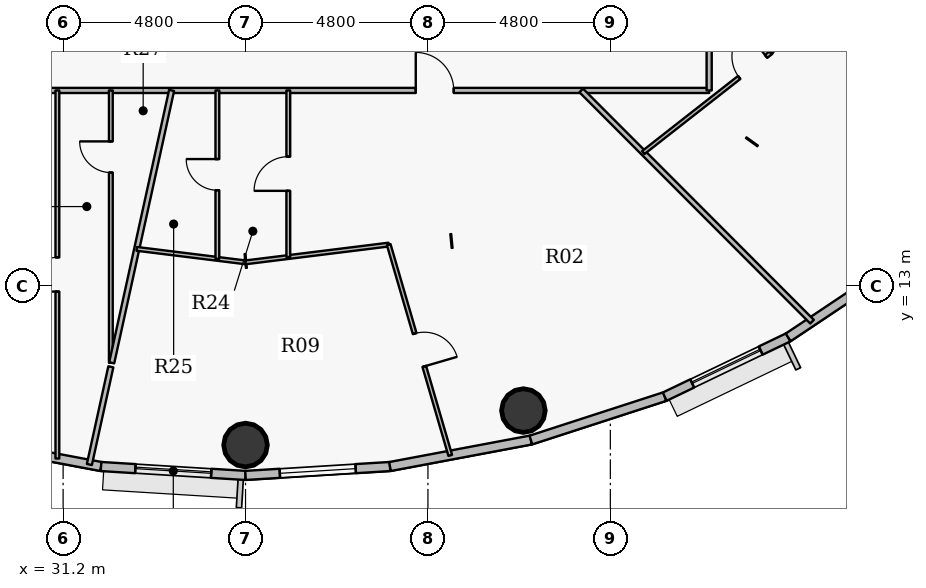
"""IFC4 building model, lengths in metres.
Left out: names, types, materials, properties, quantities, classifications, styles, units other than length and angle.
Written with IfcOpenShell. Run it as: python <this file> out.ifc"""

import sys

from ifc_helpers import new_model, si_unit, direction, frame, frame_2d, origin, origin_2d, place, context, subcontext, project, spatial, rectangle, hollow_circle, extrude, source, transform, mapped, element, fill, save


model = new_model("IFC4")
c1 = context("Model", 3, precision=1e-05, world=origin(), true_north=direction((0.0, 1.0)))
c2 = subcontext(c1, "Body", "Model", "MODEL_VIEW")
j1 = project(units=[si_unit("LENGTHUNIT", "METRE"), si_unit("PLANEANGLEUNIT", "RADIAN")], contexts=[c1])
p1 = place(None, origin())
s1 = spatial("IfcSite", under=j1, at=p1, CompositionType="ELEMENT")
p2 = place(p1, origin())
s2 = spatial("IfcBuilding", under=s1, at=p2, CompositionType="ELEMENT")
p3 = place(p2, frame((0.0, 0.0, 214.05)))
s3 = spatial("IfcBuildingStorey", under=s2, at=p3, CompositionType="ELEMENT", Elevation=214.05)
for number, where, z_axis, x_axis in (
    (1, (36.0, 8.82, 0.0), (0.0, 0.0, 1.0), (1.0, 0.0, 0.0)),
    (2, (43.312, 9.727, 0.0), (0.0, 0.0, 1.0), (1.0, 0.0, 0.0)),
):
    element("IfcColumn", number, at=place(p3, frame(where, z_axis=z_axis, x_axis=x_axis)), inside=s3, PredefinedType="COLUMN", context=c2, shape_type="SweptSolid", body=[
        extrude(hollow_circle(Radius=0.575, WallThickness=0.036, at=origin_2d()), origin(), (0.0, 0.0, 1.0), 3.75),
    ])
p4 = place(p3, frame((32.198, 8.254, 0.0), z_axis=(0.0, 0.0, 1.0), x_axis=(-0.982784898575, 0.184753465822, 0.0)))
e3 = element("IfcWall", 3, at=p4, inside=s3, PredefinedType="SOLIDWALL", context=c2, shape_type="SweptSolid", body=[
    extrude(rectangle(XDim=3.773, YDim=0.24, at=frame_2d((1.886, 0.0))), origin(), (0.0, 0.0, 1.0), 3.5),
])
p5 = place(p4, frame((1.664, 0.0, 0.9)))
e4 = element("IfcOpeningElement", 4, at=p5, cuts=e3, PredefinedType="OPENING", context=c2, shape_type="SweptSolid", body=[
    extrude(rectangle(XDim=1.25, YDim=1.65, at=origin_2d()), frame((0.625, 0.13, 0.825), z_axis=(0.0, -1.0, 0.0), x_axis=(1.0, 0.0, 0.0)), (0.0, 0.0, 1.0), 0.26),
])
p6 = place(p3, frame((36.0, 8.02, 0.0), z_axis=(0.0, 0.0, 1.0), x_axis=(-0.998108785312, 0.06147237333, 0.0)))
e5 = element("IfcWall", 5, at=p6, inside=s3, PredefinedType="SOLIDWALL", context=c2, shape_type="SweptSolid", body=[
    extrude(rectangle(XDim=3.809, YDim=0.24, at=frame_2d((1.904, 0.0))), origin(), (0.0, 0.0, 1.0), 3.5),
])
p7 = place(p6, frame((0.904, 0.0, 0.9)))
e6 = element("IfcOpeningElement", 6, at=p7, cuts=e5, PredefinedType="OPENING", context=c2, shape_type="SweptSolid", body=[
    extrude(rectangle(XDim=2.0, YDim=1.75, at=origin_2d()), frame((1.0, 0.13, 0.875), z_axis=(0.0, -1.0, 0.0), x_axis=(1.0, 0.0, 0.0)), (0.0, 0.0, 1.0), 0.26),
])
p8 = place(p3, frame((39.802, 8.254, 0.0), z_axis=(0.0, 0.0, 1.0), x_axis=(-0.998108785312, -0.06147237333, 0.0)))
e7 = element("IfcWall", 7, at=p8, inside=s3, PredefinedType="SOLIDWALL", context=c2, shape_type="SweptSolid", body=[
    extrude(rectangle(XDim=3.809, YDim=0.24, at=frame_2d((1.904, 0.0))), origin(), (0.0, 0.0, 1.0), 3.5),
])
p9 = place(p8, frame((0.905, 0.0, 0.9)))
e8 = element("IfcOpeningElement", 8, at=p9, cuts=e7, PredefinedType="OPENING", context=c2, shape_type="SweptSolid", body=[
    extrude(rectangle(XDim=2.0, YDim=1.75, at=origin_2d()), frame((1.0, 0.13, 0.875), z_axis=(0.0, -1.0, 0.0), x_axis=(1.0, 0.0, 0.0)), (0.0, 0.0, 1.0), 0.26),
])
p10 = place(p3, frame((43.509, 8.951, 0.0), z_axis=(0.0, 0.0, 1.0), x_axis=(-0.982784898575, -0.184753465822, 0.0)))
e9 = element("IfcWall", 9, at=p10, inside=s3, PredefinedType="SOLIDWALL", context=c2, shape_type="SweptSolid", body=[
    extrude(rectangle(XDim=3.773, YDim=0.24, at=frame_2d((1.886, 0.0))), origin(), (0.0, 0.0, 1.0), 3.5),
])
p11 = place(p3, frame((47.031, 10.094, 0.0), z_axis=(0.0, 0.0, 1.0), x_axis=(-0.951210789182, -0.308541787354, 0.0)))
e10 = element("IfcWall", 10, at=p11, inside=s3, PredefinedType="SOLIDWALL", context=c2, shape_type="SweptSolid", body=[
    extrude(rectangle(XDim=3.702, YDim=0.24, at=frame_2d((1.851, 0.0))), origin(), (0.0, 0.0, 1.0), 3.5),
])
p12 = place(p3, frame((50.28, 11.652, 0.0), z_axis=(0.0, 0.0, 1.0), x_axis=(-0.901598104751, -0.432574684313, 0.0)))
e11 = element("IfcWall", 11, at=p12, inside=s3, PredefinedType="SOLIDWALL", context=c2, shape_type="SweptSolid", body=[
    extrude(rectangle(XDim=3.604, YDim=0.24, at=frame_2d((1.802, 0.0))), origin(), (0.0, 0.0, 1.0), 3.5),
])
p13 = place(p12, frame((0.802, 0.0, 0.9)))
e12 = element("IfcOpeningElement", 12, at=p13, cuts=e11, PredefinedType="OPENING", context=c2, shape_type="SweptSolid", body=[
    extrude(rectangle(XDim=2.0, YDim=1.75, at=origin_2d()), frame((1.0, 0.13, 0.875), z_axis=(0.0, -1.0, 0.0), x_axis=(1.0, 0.0, 0.0)), (0.0, 0.0, 1.0), 0.26),
])
p14 = place(p3, frame((53.176, 13.589, 0.0), z_axis=(0.0, 0.0, 1.0), x_axis=(-0.831262496074, -0.555880079352, 0.0)))
e13 = element("IfcWall", 13, at=p14, inside=s3, PredefinedType="SOLIDWALL", context=c2, shape_type="SweptSolid", body=[
    extrude(rectangle(XDim=3.484, YDim=0.24, at=frame_2d((1.742, 0.0))), origin(), (0.0, 0.0, 1.0), 3.5),
])
p15 = place(p3, frame((24.35, 18.15, 0.0), z_axis=(0.0, 0.0, 1.0), x_axis=(1.0, 0.0, 0.0)))
e14 = element("IfcWall", 14, at=p15, inside=s3, PredefinedType="PARTITIONING", context=c2, shape_type="SweptSolid", body=[
    extrude(rectangle(XDim=23.85, YDim=0.135, at=frame_2d((11.925, 0.0))), origin(), (0.0, 0.0, 1.0), 2.935),
])
p16 = place(p15, frame((2.87, 0.0, 0.0)))
e15 = element("IfcOpeningElement", 15, at=p16, cuts=e14, PredefinedType="OPENING", context=c2, shape_type="SweptSolid", body=[
    extrude(rectangle(XDim=1.0, YDim=2.15, at=origin_2d()), frame((0.5, 0.078, 1.075), z_axis=(0.0, -1.0, 0.0), x_axis=(1.0, 0.0, 0.0)), (0.0, 0.0, 1.0), 0.155),
])
p17 = place(p15, frame((16.13, 0.0, 0.0)))
e16 = element("IfcOpeningElement", 16, at=p17, cuts=e14, PredefinedType="OPENING", context=c2, shape_type="SweptSolid", body=[
    extrude(rectangle(XDim=1.0, YDim=2.15, at=origin_2d()), frame((0.5, 0.078, 1.075), z_axis=(0.0, -1.0, 0.0), x_axis=(1.0, 0.0, 0.0)), (0.0, 0.0, 1.0), 0.155),
])
p18 = place(p3, frame((31.049, 8.465, 0.0), z_axis=(0.0, 0.0, 1.0), x_axis=(0.0, 1.0, 0.0)))
e17 = element("IfcWall", 17, at=p18, inside=s3, PredefinedType="PARTITIONING", context=c2, shape_type="SweptSolid", body=[
    extrude(rectangle(XDim=9.685, YDim=0.1, at=frame_2d((4.842, 0.0))), origin(), (0.0, 0.0, 1.0), 2.985),
])
p19 = place(p18, frame((4.392, 0.0, 0.0)))
e18 = element("IfcOpeningElement", 18, at=p19, cuts=e17, PredefinedType="OPENING", context=c2, shape_type="SweptSolid", body=[
    extrude(rectangle(XDim=0.9, YDim=2.1, at=origin_2d()), frame((0.45, 0.06, 1.05), z_axis=(0.0, -1.0, 0.0), x_axis=(1.0, 0.0, 0.0)), (0.0, 0.0, 1.0), 0.12),
])
p20 = place(p3, frame((31.891, 8.307, 0.0), z_axis=(0.0, 0.0, 1.0), x_axis=(0.214700779338, 0.976679873526, 0.0)))
e19 = element("IfcWall", 19, at=p20, inside=s3, PredefinedType="PARTITIONING", context=c2, shape_type="SweptSolid", body=[
    extrude(rectangle(XDim=2.632, YDim=0.135, at=frame_2d((1.316, 0.0))), origin(), (0.0, 0.0, 1.0), 2.985),
])
p21 = place(p3, frame((32.456, 10.985, 0.0), z_axis=(0.0, 0.0, 1.0), x_axis=(0.0, 1.0, 0.0)))
e20 = element("IfcWall", 20, at=p21, inside=s3, PredefinedType="PARTITIONING", context=c2, shape_type="SweptSolid", body=[
    extrude(rectangle(XDim=7.165, YDim=0.1, at=frame_2d((3.582, 0.0))), origin(), (0.0, 0.0, 1.0), 3.5),
])
p22 = place(p21, frame((5.004, 0.0, 0.0)))
e21 = element("IfcOpeningElement", 21, at=p22, cuts=e20, PredefinedType="OPENING", context=c2, shape_type="SweptSolid", body=[
    extrude(rectangle(XDim=0.82, YDim=2.1, at=origin_2d()), frame((0.41, 0.06, 1.05), z_axis=(0.0, -1.0, 0.0), x_axis=(1.0, 0.0, 0.0)), (0.0, 0.0, 1.0), 0.12),
])
p23 = place(p3, frame((32.479, 10.983, 0.0), z_axis=(0.0, 0.0, 1.0), x_axis=(0.214685976808, 0.976683127407, 0.0)))
e22 = element("IfcWall", 22, at=p23, inside=s3, PredefinedType="PARTITIONING", context=c2, shape_type="SweptSolid", body=[
    extrude(rectangle(XDim=7.338, YDim=0.135, at=frame_2d((3.669, 0.0))), origin(), (0.0, 0.0, 1.0), 3.5),
])
p24 = place(p3, frame((33.138, 13.981, 0.0), z_axis=(0.0, 0.0, 1.0), x_axis=(0.99239465631, -0.123096897311, 0.0)))
e23 = element("IfcWall", 23, at=p24, inside=s3, PredefinedType="PARTITIONING", context=c2, shape_type="SweptSolid", body=[
    extrude(rectangle(XDim=2.884, YDim=0.1, at=frame_2d((1.442, 0.0))), origin(), (0.0, 0.0, 1.0), 2.935),
])
p25 = place(p3, frame((35.259, 13.718, 0.0), z_axis=(0.0, 0.0, 1.0), x_axis=(0.0, 1.0, 0.0)))
e24 = element("IfcWall", 24, at=p25, inside=s3, PredefinedType="PARTITIONING", context=c2, shape_type="SweptSolid", body=[
    extrude(rectangle(XDim=4.432, YDim=0.1, at=frame_2d((2.216, 0.0))), origin(), (0.0, 0.0, 1.0), 3.5),
])
p26 = place(p25, frame((1.806, 0.0, 0.0)))
e25 = element("IfcOpeningElement", 25, at=p26, cuts=e24, PredefinedType="OPENING", context=c2, shape_type="SweptSolid", body=[
    extrude(rectangle(XDim=0.82, YDim=2.1, at=origin_2d()), frame((0.41, 0.06, 1.05), z_axis=(0.0, -1.0, 0.0), x_axis=(1.0, 0.0, 0.0)), (0.0, 0.0, 1.0), 0.12),
])
p27 = place(p3, frame((36.0, 13.626, 0.0), z_axis=(0.0, 0.0, 1.0), x_axis=(0.992397118202, 0.123077048159, 0.0)))
e26 = element("IfcWall", 26, at=p27, inside=s3, PredefinedType="PARTITIONING", context=c2, shape_type="SweptSolid", body=[
    extrude(rectangle(XDim=3.797, YDim=0.1, at=frame_2d((1.898, 0.0))), origin(), (0.0, 0.0, 1.0), 2.935),
])
p28 = place(p3, frame((37.126, 13.766, 0.0), z_axis=(0.0, 0.0, 1.0), x_axis=(0.0, 1.0, 0.0)))
e27 = element("IfcWall", 27, at=p28, inside=s3, PredefinedType="PARTITIONING", context=c2, shape_type="SweptSolid", body=[
    extrude(rectangle(XDim=4.384, YDim=0.1, at=frame_2d((2.192, 0.0))), origin(), (0.0, 0.0, 1.0), 3.185),
])
p29 = place(p28, frame((1.742, 0.0, 0.0)))
e28 = element("IfcOpeningElement", 28, at=p29, cuts=e27, PredefinedType="OPENING", context=c2, shape_type="SweptSolid", body=[
    extrude(rectangle(XDim=0.9, YDim=2.1, at=origin_2d()), frame((0.45, 0.06, 1.05), z_axis=(0.0, -1.0, 0.0), x_axis=(1.0, 0.0, 0.0)), (0.0, 0.0, 1.0), 0.12),
])
p30 = place(p3, frame((39.768, 14.094, 0.0), z_axis=(0.0, 0.0, 1.0), x_axis=(0.280219030024, -0.959936089129, 0.0)))
e29 = element("IfcWall", 29, at=p30, inside=s3, PredefinedType="PARTITIONING", context=c2, shape_type="SweptSolid", body=[
    extrude(rectangle(XDim=5.778, YDim=0.1, at=frame_2d((2.889, 0.0))), origin(), (0.0, 0.0, 1.0), 2.985),
])
p31 = place(p30, frame((2.439, 0.0, 0.0)))
e30 = element("IfcOpeningElement", 30, at=p31, cuts=e29, PredefinedType="OPENING", context=c2, shape_type="SweptSolid", body=[
    extrude(rectangle(XDim=0.9, YDim=2.1, at=origin_2d()), frame((0.45, 0.06, 1.05), z_axis=(0.0, -1.0, 0.0), x_axis=(1.0, 0.0, 0.0)), (0.0, 0.0, 1.0), 0.12),
])
p32 = place(p3, frame((44.833, 18.15, 0.0), z_axis=(0.0, 0.0, 1.0), x_axis=(0.706467502326, -0.707745482612, 0.0)))
e31 = element("IfcWall", 31, at=p32, inside=s3, PredefinedType="PARTITIONING", context=c2, shape_type="SweptSolid", body=[
    extrude(rectangle(XDim=8.597, YDim=0.135, at=frame_2d((4.298, 0.0))), origin(), (0.0, 0.0, 1.0), 2.985),
])
p33 = place(p3, frame((46.466, 16.515, 0.0), z_axis=(0.0, 0.0, 1.0), x_axis=(0.787371868093, 0.616478338092, 0.0)))
e32 = element("IfcWall", 32, at=p33, inside=s3, PredefinedType="PARTITIONING", context=c2, shape_type="SweptSolid", body=[
    extrude(rectangle(XDim=4.257, YDim=0.1, at=frame_2d((2.129, 0.0))), origin(), (0.0, 0.0, 1.0), 2.935),
])
p34 = place(p33, frame((3.206, 0.0, 0.0)))
e33 = element("IfcOpeningElement", 33, at=p34, cuts=e32, PredefinedType="OPENING", context=c2, shape_type="SweptSolid", body=[
    extrude(rectangle(XDim=0.9, YDim=2.1, at=origin_2d()), frame((0.45, 0.06, 1.05), z_axis=(0.0, -1.0, 0.0), x_axis=(1.0, 0.0, 0.0)), (0.0, 0.0, 1.0), 0.12),
])
p35 = place(p3, frame((48.2, 18.15, 0.0), z_axis=(0.0, 0.0, 1.0), x_axis=(0.0, 1.0, 0.0)))
e34 = element("IfcWall", 34, at=p35, inside=s3, PredefinedType="PARTITIONING", context=c2, shape_type="SweptSolid", body=[
    extrude(rectangle(XDim=1.9, YDim=0.135, at=frame_2d((0.95, 0.0))), origin(), (0.0, 0.0, 1.0), 3.5),
])
p36 = place(p3, frame((49.818, 19.139, 0.0), z_axis=(0.0, 0.0, 1.0), x_axis=(0.545406924684, 0.83817139447, 0.0)))
e35 = element("IfcWall", 35, at=p36, inside=s3, PredefinedType="PARTITIONING", context=c2, shape_type="SweptSolid", body=[
    extrude(rectangle(XDim=4.448, YDim=0.1, at=frame_2d((2.224, 0.0))), origin(), (0.0, 0.0, 1.0), 2.935),
])
m1 = source(origin(), c2, "Body", "SweptSolid", [
    extrude(rectangle(XDim=2.0, YDim=1.75, at=origin_2d()), frame((1.0, 0.03, 0.875), z_axis=(0.0, -1.0, 0.0), x_axis=(1.0, 0.0, 0.0)), (0.0, 0.0, 1.0), 0.06),
])
p37 = place(p7, origin())
e36 = element("IfcWindow", 36, at=p37, inside=s3, PartitioningType="DOUBLE_PANEL_VERTICAL", PredefinedType="WINDOW", context=c2, shape_type="MappedRepresentation", body=[
    mapped(m1, transform((0.0, 0.0, 0.0), x_axis=(1.0, 0.0, 0.0), y_axis=(0.0, 1.0, 0.0), z_axis=(0.0, 0.0, 1.0), scale=1.0)),
])
fill(e6, e36)
p38 = place(p9, origin())
e37 = element("IfcWindow", 37, at=p38, inside=s3, PartitioningType="DOUBLE_PANEL_VERTICAL", PredefinedType="WINDOW", context=c2, shape_type="MappedRepresentation", body=[
    mapped(m1, transform((0.0, 0.0, 0.0), x_axis=(1.0, 0.0, 0.0), y_axis=(0.0, 1.0, 0.0), z_axis=(0.0, 0.0, 1.0), scale=1.0)),
])
fill(e8, e37)
p39 = place(p13, origin())
e38 = element("IfcWindow", 38, at=p39, inside=s3, PartitioningType="DOUBLE_PANEL_VERTICAL", PredefinedType="WINDOW", context=c2, shape_type="MappedRepresentation", body=[
    mapped(m1, transform((0.0, 0.0, 0.0), x_axis=(1.0, 0.0, 0.0), y_axis=(0.0, 1.0, 0.0), z_axis=(0.0, 0.0, 1.0), scale=1.0)),
])
fill(e12, e38)
m2 = source(origin(), c2, "Body", "SweptSolid", [
    extrude(rectangle(XDim=0.9, YDim=2.1, at=origin_2d()), frame((0.45, 0.025, 1.05), z_axis=(0.0, -1.0, 0.0), x_axis=(1.0, 0.0, 0.0)), (0.0, 0.0, 1.0), 0.05),
])
p40 = place(p19, origin())
e39 = element("IfcDoor", 39, at=p40, inside=s3, OperationType="SINGLE_SWING_LEFT", PredefinedType="DOOR", context=c2, shape_type="MappedRepresentation", body=[
    mapped(m2, transform((0.0, 0.0, 0.0), x_axis=(1.0, 0.0, 0.0), y_axis=(0.0, 1.0, 0.0), z_axis=(0.0, 0.0, 1.0), scale=1.0)),
])
fill(e18, e39)
m3 = source(origin(), c2, "Body", "SweptSolid", [
    extrude(rectangle(XDim=0.82, YDim=2.1, at=origin_2d()), frame((0.41, 0.025, 1.05), z_axis=(0.0, -1.0, 0.0), x_axis=(1.0, 0.0, 0.0)), (0.0, 0.0, 1.0), 0.05),
])
p41 = place(p22, origin())
e40 = element("IfcDoor", 40, at=p41, inside=s3, OperationType="SINGLE_SWING_RIGHT", PredefinedType="DOOR", context=c2, shape_type="MappedRepresentation", body=[
    mapped(m3, transform((0.0, 0.0, 0.0), x_axis=(1.0, 0.0, 0.0), y_axis=(0.0, 1.0, 0.0), z_axis=(0.0, 0.0, 1.0), scale=1.0)),
])
fill(e21, e40)
m4 = source(origin(), c2, "Body", "SweptSolid", [
    extrude(rectangle(XDim=1.0, YDim=2.15, at=origin_2d()), frame((0.5, 0.025, 1.075), z_axis=(0.0, -1.0, 0.0), x_axis=(1.0, 0.0, 0.0)), (0.0, 0.0, 1.0), 0.05),
])
p42 = place(p17, origin())
e41 = element("IfcDoor", 41, at=p42, inside=s3, OperationType="SINGLE_SWING_LEFT", PredefinedType="DOOR", context=c2, shape_type="MappedRepresentation", body=[
    mapped(m4, transform((0.0, 0.0, 0.0), x_axis=(1.0, 0.0, 0.0), y_axis=(0.0, 1.0, 0.0), z_axis=(0.0, 0.0, 1.0), scale=1.0)),
])
fill(e16, e41)
p43 = place(p31, origin())
e42 = element("IfcDoor", 42, at=p43, inside=s3, OperationType="SINGLE_SWING_RIGHT", PredefinedType="DOOR", context=c2, shape_type="MappedRepresentation", body=[
    mapped(m2, transform((0.0, 0.0, 0.0), x_axis=(1.0, 0.0, 0.0), y_axis=(0.0, 1.0, 0.0), z_axis=(0.0, 0.0, 1.0), scale=1.0)),
])
fill(e30, e42)
p44 = place(p29, origin())
e43 = element("IfcDoor", 43, at=p44, inside=s3, OperationType="SINGLE_SWING_LEFT", PredefinedType="DOOR", context=c2, shape_type="MappedRepresentation", body=[
    mapped(m2, transform((0.0, 0.0, 0.0), x_axis=(1.0, 0.0, 0.0), y_axis=(0.0, 1.0, 0.0), z_axis=(0.0, 0.0, 1.0), scale=1.0)),
])
fill(e28, e43)
p45 = place(p26, origin())
e44 = element("IfcDoor", 44, at=p45, inside=s3, OperationType="SINGLE_SWING_RIGHT", PredefinedType="DOOR", context=c2, shape_type="MappedRepresentation", body=[
    mapped(m3, transform((0.0, 0.0, 0.0), x_axis=(1.0, 0.0, 0.0), y_axis=(0.0, 1.0, 0.0), z_axis=(0.0, 0.0, 1.0), scale=1.0)),
])
fill(e25, e44)
p46 = place(p34, origin())
e45 = element("IfcDoor", 45, at=p46, inside=s3, OperationType="SINGLE_SWING_RIGHT", PredefinedType="DOOR", context=c2, shape_type="MappedRepresentation", body=[
    mapped(m2, transform((0.0, 0.0, 0.0), x_axis=(1.0, 0.0, 0.0), y_axis=(0.0, 1.0, 0.0), z_axis=(0.0, 0.0, 1.0), scale=1.0)),
])
fill(e33, e45)
save(model, sys.argv[1])
